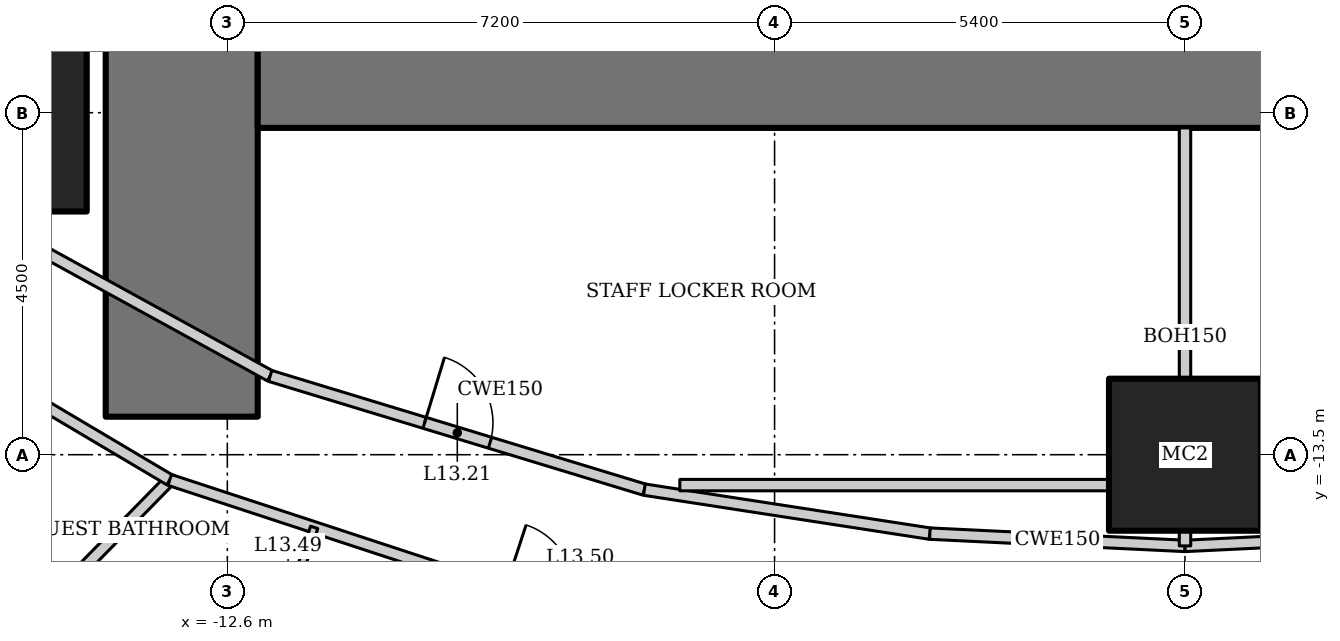
"""IFC4 building model, lengths in metres.
Left out: names, types, materials, properties, quantities, classifications, styles, units other than length and angle.
Written with IfcOpenShell. Run it as: python <this file> out.ifc"""

import sys

from ifc_helpers import new_model, si_unit, direction, frame, frame_2d, origin, origin_2d, place, context, subcontext, project, spatial, rectangle, hollow_rectangle, extrude, element, fill, save


model = new_model("IFC4")
c1 = context("Model", 3, precision=1e-05, world=origin(), true_north=direction((0.0, 1.0)))
c2 = subcontext(c1, "Body", "Model", "MODEL_VIEW")
j1 = project(units=[si_unit("LENGTHUNIT", "METRE"), si_unit("PLANEANGLEUNIT", "RADIAN")], contexts=[c1])
p1 = place(None, origin())
s1 = spatial("IfcSite", under=j1, at=p1, CompositionType="ELEMENT")
p2 = place(p1, origin())
s2 = spatial("IfcBuilding", under=s1, at=p2, CompositionType="ELEMENT")
p3 = place(p2, frame((0.0, 0.0, 62.2)))
s3 = spatial("IfcBuildingStorey", under=s2, at=p3, CompositionType="ELEMENT", Elevation=62.2)
p4 = place(p3, frame((-15.75, -9.0, 0.0), z_axis=(0.0, 0.0, 1.0), x_axis=(1.0, 0.0, 0.0)))
e1 = element("IfcColumn", 1, at=p4, inside=s3, PredefinedType="COLUMN", context=c2, shape_type="SweptSolid", body=[
    extrude(hollow_rectangle(XDim=2.6, YDim=2.6, WallThickness=0.13, at=origin_2d()), origin(), (0.0, 0.0, 1.0), 3.6),
])
p5 = place(p3, frame((0.0, -13.5, 0.0), z_axis=(0.0, 0.0, 1.0), x_axis=(1.0, 0.0, 0.0)))
e2 = element("IfcColumn", 2, at=p5, inside=s3, PredefinedType="COLUMN", context=c2, shape_type="SweptSolid", body=[
    extrude(hollow_rectangle(XDim=2.0, YDim=2.0, WallThickness=0.17, at=origin_2d()), origin(), (0.0, 0.0, 1.0), 3.6),
])
p6 = place(p3, frame((-13.2, 13.0, 0.0), z_axis=(0.0, 0.0, 1.0), x_axis=(0.0, -1.0, 0.0)))
e3 = element("IfcWall", 3, at=p6, inside=s3, PredefinedType="SHEAR", context=c2, shape_type="SweptSolid", body=[
    extrude(rectangle(XDim=26.0, YDim=2.0, at=frame_2d((13.0, 0.0))), origin(), (0.0, 0.0, 1.0), 3.6),
])
p7 = place(p6, frame((12.1, 0.0, 0.0)))
e4 = element("IfcOpeningElement", 4, at=p7, cuts=e3, PredefinedType="OPENING", context=c2, shape_type="SweptSolid", body=[
    extrude(rectangle(XDim=1.8, YDim=2.1, at=frame_2d((0.9, 1.05))), frame((0.0, 1.01, 0.0), z_axis=(0.0, -1.0, 0.0), x_axis=(1.0, 0.0, 0.0)), (0.0, 0.0, 1.0), 2.02),
])
p8 = place(p3, frame((-12.2, -8.0, 0.0), z_axis=(0.0, 0.0, 1.0), x_axis=(1.0, 0.0, 0.0)))
e5 = element("IfcWall", 5, at=p8, inside=s3, PredefinedType="SHEAR", context=c2, shape_type="SweptSolid", body=[
    extrude(rectangle(XDim=24.4, YDim=2.4, at=frame_2d((12.2, 0.0))), origin(), (0.0, 0.0, 1.0), 3.6),
])
p9 = place(p3, frame((-17.97, -18.542, 0.0), z_axis=(0.0, 0.0, 1.0), x_axis=(0.699736251994, 0.714401272147, 0.0)))
e6 = element("IfcWall", 6, at=p9, inside=s3, PredefinedType="PARTITIONING", context=c2, shape_type="SweptSolid", body=[
    extrude(rectangle(XDim=6.593, YDim=0.15, at=frame_2d((3.296, 0.0))), origin(), (0.0, 0.0, 1.0), 2.528),
])
p10 = place(p3, frame((-18.681, -10.675, 0.0), z_axis=(0.0, 0.0, 1.0), x_axis=(0.860147339762, -0.510045639036, 0.0)))
e7 = element("IfcWall", 7, at=p10, inside=s3, PredefinedType="PARTITIONING", context=c2, shape_type="SweptSolid", body=[
    extrude(rectangle(XDim=6.19, YDim=0.15, at=frame_2d((3.095, 0.0))), origin(), (0.0, 0.0, 1.0), 3.45),
])
p11 = place(p10, frame((2.505, 0.0, 0.0)))
e8 = element("IfcOpeningElement", 8, at=p11, cuts=e7, PredefinedType="OPENING", context=c2, shape_type="SweptSolid", body=[
    extrude(rectangle(XDim=0.9, YDim=2.1, at=frame_2d((0.45, 1.05))), frame((0.0, 0.085, 0.0), z_axis=(0.0, -1.0, 0.0), x_axis=(1.0, 0.0, 0.0)), (0.0, 0.0, 1.0), 0.17),
])
p12 = place(p3, frame((-13.357, -13.832, 0.0), z_axis=(0.0, 0.0, 1.0), x_axis=(0.950106803111, -0.311924770869, 0.0)))
e9 = element("IfcWall", 9, at=p12, inside=s3, PredefinedType="PARTITIONING", context=c2, shape_type="SweptSolid", body=[
    extrude(rectangle(XDim=5.689, YDim=0.15, at=frame_2d((2.845, 0.0))), origin(), (0.0, 0.0, 1.0), 3.45),
])
p13 = place(p12, frame((4.639, 0.0, 0.0)))
e10 = element("IfcOpeningElement", 10, at=p13, cuts=e9, PredefinedType="OPENING", context=c2, shape_type="SweptSolid", body=[
    extrude(rectangle(XDim=0.9, YDim=2.1, at=frame_2d((0.45, 1.05))), frame((0.0, 0.085, 0.0), z_axis=(0.0, -1.0, 0.0), x_axis=(1.0, 0.0, 0.0)), (0.0, 0.0, 1.0), 0.17),
])
p14 = place(p3, frame((-17.021, -9.726, 0.0), z_axis=(0.0, 0.0, 1.0), x_axis=(0.876522084062, -0.481361647986, 0.0)))
e11 = element("IfcWall", 11, at=p14, inside=s3, PredefinedType="PARTITIONING", context=c2, shape_type="SweptSolid", body=[
    extrude(rectangle(XDim=5.687, YDim=0.15, at=frame_2d((2.844, 0.0))), origin(), (0.0, 0.0, 1.0), 3.45),
])
p15 = place(p3, frame((-12.036, -12.464, 0.0), z_axis=(0.0, 0.0, 1.0), x_axis=(0.956795045135, -0.290763205385, 0.0)))
e12 = element("IfcWall", 12, at=p15, inside=s3, PredefinedType="PARTITIONING", context=c2, shape_type="SweptSolid", body=[
    extrude(rectangle(XDim=5.146, YDim=0.15, at=frame_2d((2.573, 0.0))), origin(), (0.0, 0.0, 1.0), 3.45),
])
p16 = place(p15, frame((2.123, 0.0, 0.0)))
e13 = element("IfcOpeningElement", 13, at=p16, cuts=e12, PredefinedType="OPENING", context=c2, shape_type="SweptSolid", body=[
    extrude(rectangle(XDim=0.9, YDim=2.1, at=frame_2d((0.45, 1.05))), frame((0.0, 0.085, 0.0), z_axis=(0.0, -1.0, 0.0), x_axis=(1.0, 0.0, 0.0)), (0.0, 0.0, 1.0), 0.17),
])
p17 = place(p3, frame((-7.113, -13.96, 0.0), z_axis=(0.0, 0.0, 1.0), x_axis=(0.988343461108, -0.152240608529, 0.0)))
e14 = element("IfcWall", 14, at=p17, inside=s3, PredefinedType="PARTITIONING", context=c2, shape_type="SweptSolid", body=[
    extrude(rectangle(XDim=3.801, YDim=0.15, at=frame_2d((1.9, 0.0))), origin(), (0.0, 0.0, 1.0), 3.45),
])
for number, where, z_axis, x_axis in (
    (15, (-3.356, -14.538, 0.0), (0.0, 0.0, 1.0), (0.999, -0.048, 0.0)),
    (16, (0.0, -14.7, 0.0), (0.0, 0.0, 1.0), (0.999, 0.048, 0.0)),
):
    element("IfcWall", number, at=place(p3, frame(where, z_axis=z_axis, x_axis=x_axis)), inside=s3, PredefinedType="PARTITIONING", context=c2, shape_type="SweptSolid", body=[
        extrude(rectangle(XDim=3.36, YDim=0.15, at=frame_2d((1.68, 0.0))), origin(), (0.0, 0.0, 1.0), 3.45),
    ])
p18 = place(p3, frame((0.0, -9.2, 0.0), z_axis=(0.0, 0.0, 1.0), x_axis=(0.0, -1.0, 0.0)))
e17 = element("IfcWall", 17, at=p18, inside=s3, PredefinedType="PARTITIONING", context=c2, shape_type="SweptSolid", body=[
    extrude(rectangle(XDim=5.5, YDim=0.15, at=frame_2d((2.75, 0.0))), origin(), (0.0, 0.0, 1.0), 2.924),
])
p19 = place(p3, frame((-6.647, -13.9, 0.0), z_axis=(0.0, 0.0, 1.0), x_axis=(1.0, 0.0, 0.0)))
e18 = element("IfcWall", 18, at=p19, inside=s3, PredefinedType="PARTITIONING", context=c2, shape_type="SweptSolid", body=[
    extrude(rectangle(XDim=6.647, YDim=0.15, at=frame_2d((3.323, 0.0))), origin(), (0.0, 0.0, 1.0), 3.45),
])
p20 = place(p3, frame((0.0, -14.4, 0.0), z_axis=(0.0, 0.0, 1.0), x_axis=(1.0, 0.0, 0.0)))
e19 = element("IfcWall", 19, at=p20, inside=s3, PredefinedType="PARTITIONING", context=c2, shape_type="SweptSolid", body=[
    extrude(rectangle(XDim=3.401, YDim=0.15, at=frame_2d((1.701, 0.0))), origin(), (0.0, 0.0, 1.0), 3.45),
])
p21 = place(p3, frame((-11.457, -14.456, 0.0), z_axis=(0.0, 0.0, 1.0), x_axis=(-0.311890952591, -0.950117905153, 0.0)))
e20 = element("IfcWall", 20, at=p21, inside=s3, PredefinedType="PARTITIONING", context=c2, shape_type="SweptSolid", body=[
    extrude(rectangle(XDim=2.4, YDim=0.1, at=frame_2d((1.2, 0.0))), origin(), (0.0, 0.0, 1.0), 3.45),
])
p22 = place(p21, frame((0.7, 0.0, 0.0)))
e21 = element("IfcOpeningElement", 21, at=p22, cuts=e20, PredefinedType="OPENING", context=c2, shape_type="SweptSolid", body=[
    extrude(rectangle(XDim=0.8, YDim=2.1, at=frame_2d((0.4, 1.05))), frame((0.0, 0.06, 0.0), z_axis=(0.0, -1.0, 0.0), x_axis=(1.0, 0.0, 0.0)), (0.0, 0.0, 1.0), 0.12),
])
p23 = place(p16, origin())
e22 = element("IfcDoor", 22, at=p23, inside=s3, OperationType="SINGLE_SWING_LEFT", PredefinedType="DOOR", context=c2, shape_type="SweptSolid", body=[
    extrude(rectangle(XDim=0.9, YDim=2.1, at=frame_2d((0.45, 1.05))), frame((0.0, 0.025, 0.0), z_axis=(0.0, -1.0, 0.0), x_axis=(1.0, 0.0, 0.0)), (0.0, 0.0, 1.0), 0.05),
])
fill(e13, e22)
save(model, sys.argv[1])
